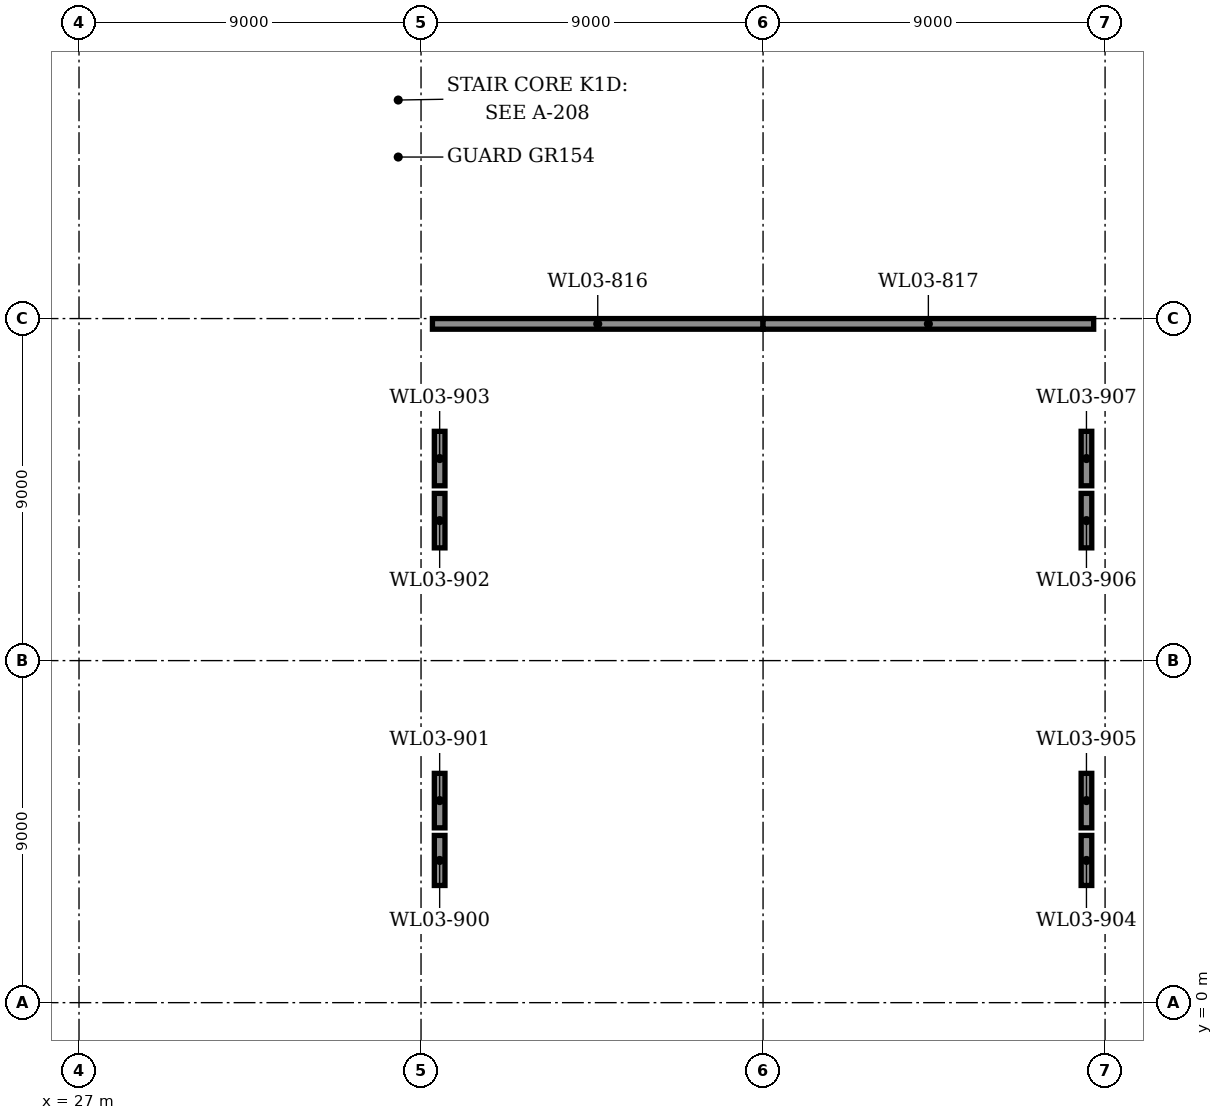
"""IFC4 building model, lengths in metres.
Left out: names, types, materials, properties, quantities, classifications, styles, units other than length and angle.
Written with IfcOpenShell. Run it as: python <this file> out.ifc"""

import sys

from ifc_helpers import new_model, si_unit, direction, frame, frame_2d, origin, origin_2d, place, context, subcontext, project, spatial, polyline, rectangle, i_section, outline, extrude, element, fill, save


model = new_model("IFC4")
c1 = context("Model", 3, precision=1e-05, world=origin(), true_north=direction((0.0, 1.0)))
c2 = subcontext(c1, "Body", "Model", "MODEL_VIEW")
j1 = project(units=[si_unit("LENGTHUNIT", "METRE"), si_unit("PLANEANGLEUNIT", "RADIAN")], contexts=[c1])
p1 = place(None, origin())
s1 = spatial("IfcSite", under=j1, at=p1, CompositionType="ELEMENT")
p2 = place(p1, origin())
s2 = spatial("IfcBuilding", under=s1, at=p2, CompositionType="ELEMENT")
p3 = place(p2, frame((0.0, 0.0, 13.4)))
s3 = spatial("IfcBuildingStorey", under=s2, at=p3, CompositionType="ELEMENT", Elevation=13.4)
p4 = place(p3, frame((45.0, 18.0, 0.0), z_axis=(0.0, 0.0, 1.0), x_axis=(1.0, 0.0, 0.0)))
e1 = element("IfcColumn", 1, at=p4, inside=s3, PredefinedType="COLUMN", context=c2, shape_type="SweptSolid", body=[
    extrude(i_section(OverallWidth=0.305, OverallDepth=0.308, WebThickness=0.01, FlangeThickness=0.015, FilletRadius=0.017, at=origin_2d()), origin(), (0.0, 0.0, 1.0), 7.4),
])
p5 = place(p3, frame((54.0, 18.09, 0.0), z_axis=(0.0, 0.0, 1.0), x_axis=(1.0, 0.0, 0.0)))
e2 = element("IfcWall", 2, at=p5, inside=s3, PredefinedType="SOLIDWALL", context=c2, shape_type="SweptSolid", body=[
    extrude(rectangle(XDim=9.0, YDim=0.3, at=frame_2d((4.5, 0.0))), origin(), (0.0, 0.0, 1.0), 7.678),
])
p6 = place(p5, frame((1.65, 0.0, 1.2)))
e3 = element("IfcOpeningElement", 3, at=p6, cuts=e2, PredefinedType="OPENING", context=c2, shape_type="SweptSolid", body=[
    extrude(rectangle(XDim=1.2, YDim=4.8, at=frame_2d((0.6, 2.4))), frame((0.0, 0.16, 0.0), z_axis=(0.0, -1.0, 0.0), x_axis=(1.0, 0.0, 0.0)), (0.0, 0.0, 1.0), 0.32),
])
p7 = place(p5, frame((6.15, 0.0, 1.2)))
e4 = element("IfcOpeningElement", 4, at=p7, cuts=e2, PredefinedType="OPENING", context=c2, shape_type="SweptSolid", body=[
    extrude(rectangle(XDim=1.2, YDim=4.8, at=frame_2d((0.6, 2.4))), frame((0.0, 0.16, 0.0), z_axis=(0.0, -1.0, 0.0), x_axis=(1.0, 0.0, 0.0)), (0.0, 0.0, 1.0), 0.32),
])
p8 = place(p3, frame((27.09, 22.5, 0.0), z_axis=(0.0, 0.0, 1.0), x_axis=(0.0, 1.0, 0.0)))
e5 = element("IfcWall", 5, at=p8, inside=s3, PredefinedType="SOLIDWALL", context=c2, shape_type="SweptSolid", body=[
    extrude(rectangle(XDim=4.35, YDim=0.3, at=frame_2d((2.175, 0.0))), origin(), (0.0, 0.0, 1.0), 7.678),
])
p9 = place(p8, frame((1.65, 0.0, 1.2)))
e6 = element("IfcOpeningElement", 6, at=p9, cuts=e5, PredefinedType="OPENING", context=c2, shape_type="SweptSolid", body=[
    extrude(rectangle(XDim=1.2, YDim=4.8, at=frame_2d((0.6, 2.4))), frame((0.0, 0.16, 0.0), z_axis=(0.0, -1.0, 0.0), x_axis=(1.0, 0.0, 0.0)), (0.0, 0.0, 1.0), 0.32),
])
for number, where, z_axis, x_axis in (
    (7, (36.49, 0.35, 0.0), (0.0, 0.0, 1.0), (0.0, 1.0, 0.0)),
    (8, (53.51, 0.35, 0.0), (0.0, 0.0, 1.0), (0.0, 1.0, 0.0)),
):
    element("IfcWall", number, at=place(p3, frame(where, z_axis=z_axis, x_axis=x_axis)), inside=s3, PredefinedType="SOLIDWALL", context=c2, shape_type="SweptSolid", body=[
        extrude(rectangle(XDim=17.65, YDim=0.28, at=frame_2d((8.825, 0.0))), origin(), (0.0, 0.0, 1.0), 5.073),
    ])
p10 = place(p3, frame((36.49, 3.083, 5.073), z_axis=(0.0, 0.0, 1.0), x_axis=(0.0, 1.0, 0.0)))
e9 = element("IfcWall", 9, at=p10, inside=s3, PredefinedType="SOLIDWALL", context=c2, shape_type="SweptSolid", body=[
    extrude(rectangle(XDim=1.317, YDim=0.28, at=frame_2d((0.658, 0.0))), origin(), (0.0, 0.0, 1.0), 2.6),
])
for number, where, z_axis, x_axis in (
    (10, (36.49, 4.6, 5.073), (0.0, 0.0, 1.0), (0.0, 1.0, 0.0)),
    (11, (36.49, 11.967, 5.073), (0.0, 0.0, 1.0), (0.0, 1.0, 0.0)),
    (12, (36.49, 13.6, 5.073), (0.0, 0.0, 1.0), (0.0, 1.0, 0.0)),
):
    element("IfcWall", number, at=place(p3, frame(where, z_axis=z_axis, x_axis=x_axis)), inside=s3, PredefinedType="SOLIDWALL", context=c2, shape_type="SweptSolid", body=[
        extrude(rectangle(XDim=1.433, YDim=0.28, at=frame_2d((0.717, 0.0))), origin(), (0.0, 0.0, 1.0), 2.6),
    ])
p11 = place(p3, frame((53.51, 3.083, 5.073), z_axis=(0.0, 0.0, 1.0), x_axis=(0.0, 1.0, 0.0)))
e13 = element("IfcWall", 13, at=p11, inside=s3, PredefinedType="SOLIDWALL", context=c2, shape_type="SweptSolid", body=[
    extrude(rectangle(XDim=1.317, YDim=0.28, at=frame_2d((0.658, 0.0))), origin(), (0.0, 0.0, 1.0), 2.6),
])
for number, where, z_axis, x_axis in (
    (14, (53.51, 4.6, 5.073), (0.0, 0.0, 1.0), (0.0, 1.0, 0.0)),
    (15, (53.51, 11.967, 5.073), (0.0, 0.0, 1.0), (0.0, 1.0, 0.0)),
    (16, (53.51, 13.6, 5.073), (0.0, 0.0, 1.0), (0.0, 1.0, 0.0)),
):
    element("IfcWall", number, at=place(p3, frame(where, z_axis=z_axis, x_axis=x_axis)), inside=s3, PredefinedType="SOLIDWALL", context=c2, shape_type="SweptSolid", body=[
        extrude(rectangle(XDim=1.433, YDim=0.28, at=frame_2d((0.717, 0.0))), origin(), (0.0, 0.0, 1.0), 2.6),
    ])
p12 = place(p3, frame((36.63, 0.275, 7.673), z_axis=(0.0, 0.0, 1.0), x_axis=(1.0, 0.0, 0.0)))
e17 = element("IfcWall", 17, at=p12, inside=s3, PredefinedType="SOLIDWALL", context=c2, shape_type="SweptSolid", body=[
    extrude(outline(polyline([(0.0, 0.0), (8.37, 0.0), (8.37, 3.207), (0.0, 0.05), (0.0, 0.0)])), frame((0.0, 0.14, 0.0), z_axis=(0.0, -1.0, 0.0), x_axis=(1.0, 0.0, 0.0)), (0.0, 0.0, 1.0), 0.28),
])
p13 = place(p3, frame((45.0, 0.275, 7.673), z_axis=(0.0, 0.0, 1.0), x_axis=(1.0, 0.0, 0.0)))
e18 = element("IfcWall", 18, at=p13, inside=s3, PredefinedType="SOLIDWALL", context=c2, shape_type="SweptSolid", body=[
    extrude(outline(polyline([(0.0, 0.0), (8.37, 0.0), (8.37, 0.05), (0.0, 3.207), (0.0, 0.0)])), frame((0.0, 0.14, 0.0), z_axis=(0.0, -1.0, 0.0), x_axis=(1.0, 0.0, 0.0)), (0.0, 0.0, 1.0), 0.28),
])
p14 = place(p3, frame((36.3, 17.86, 7.673), z_axis=(0.0, 0.0, 1.0), x_axis=(1.0, 0.0, 0.0)))
e19 = element("IfcWall", 19, at=p14, inside=s3, PredefinedType="SOLIDWALL", context=c2, shape_type="SweptSolid", body=[
    extrude(outline(polyline([(0.0, 0.0), (8.7, 0.0), (8.7, 3.207), (0.0, 0.05), (0.0, 0.0)])), frame((0.0, 0.14, 0.0), z_axis=(0.0, -1.0, 0.0), x_axis=(1.0, 0.0, 0.0)), (0.0, 0.0, 1.0), 0.28),
])
p15 = place(p3, frame((45.0, 17.86, 7.673), z_axis=(0.0, 0.0, 1.0), x_axis=(1.0, 0.0, 0.0)))
e20 = element("IfcWall", 20, at=p15, inside=s3, PredefinedType="SOLIDWALL", context=c2, shape_type="SweptSolid", body=[
    extrude(outline(polyline([(0.0, 0.0), (8.7, 0.0), (8.7, 0.05), (0.0, 3.207), (0.0, 0.0)])), frame((0.0, 0.14, 0.0), z_axis=(0.0, -1.0, 0.0), x_axis=(1.0, 0.0, 0.0)), (0.0, 0.0, 1.0), 0.28),
])
p16 = place(p3, frame((27.0, 18.15, 0.0), z_axis=(0.0, 0.0, 1.0), x_axis=(1.0, 0.0, 0.0)))
e21 = element("IfcWall", 21, at=p16, inside=s3, PredefinedType="SOLIDWALL", context=c2, shape_type="SweptSolid", body=[
    extrude(rectangle(XDim=9.0, YDim=0.3, at=frame_2d((4.5, 0.0))), origin(), (0.0, 0.0, 1.0), 7.428),
])
p17 = place(p3, frame((35.85, 18.3, 0.0), z_axis=(0.0, 0.0, 1.0), x_axis=(0.0, 1.0, 0.0)))
e22 = element("IfcWall", 22, at=p17, inside=s3, PredefinedType="SOLIDWALL", context=c2, shape_type="SweptSolid", body=[
    extrude(rectangle(XDim=3.9, YDim=0.3, at=frame_2d((1.95, 0.0))), origin(), (0.0, 0.0, 1.0), 7.428),
])
p18 = place(p3, frame((27.0, 22.35, 0.0), z_axis=(0.0, 0.0, 1.0), x_axis=(1.0, 0.0, 0.0)))
e23 = element("IfcWall", 23, at=p18, inside=s3, PredefinedType="SOLIDWALL", context=c2, shape_type="SweptSolid", body=[
    extrude(rectangle(XDim=9.0, YDim=0.3, at=frame_2d((4.5, 0.0))), origin(), (0.0, 0.0, 1.0), 7.428),
])
p19 = place(p18, frame((6.05, 0.0, 0.0)))
e24 = element("IfcOpeningElement", 24, at=p19, cuts=e23, PredefinedType="OPENING", context=c2, shape_type="SweptSolid", body=[
    extrude(rectangle(XDim=1.8, YDim=2.1, at=frame_2d((0.9, 1.05))), frame((0.0, 0.16, 0.0), z_axis=(0.0, -1.0, 0.0), x_axis=(1.0, 0.0, 0.0)), (0.0, 0.0, 1.0), 0.32),
])
p20 = place(p3, frame((27.15, 18.3, 0.0), z_axis=(0.0, 0.0, 1.0), x_axis=(0.0, 1.0, 0.0)))
e25 = element("IfcWall", 25, at=p20, inside=s3, PredefinedType="SOLIDWALL", context=c2, shape_type="SweptSolid", body=[
    extrude(rectangle(XDim=3.9, YDim=0.3, at=frame_2d((1.95, 0.0))), origin(), (0.0, 0.0, 1.0), 7.428),
])
p21 = place(p3, frame((36.0, 22.5, 0.0), z_axis=(0.0, 0.0, 1.0), x_axis=(0.0, 1.0, 0.0)))
e26 = element("IfcWall", 26, at=p21, inside=s3, PredefinedType="PARTITIONING", context=c2, shape_type="SweptSolid", body=[
    extrude(rectangle(XDim=1.5, YDim=0.15, at=frame_2d((0.75, 0.0))), origin(), (0.0, 0.0, 1.0), 6.88),
])
p22 = place(p3, frame((36.0, 24.0, 0.0), z_axis=(0.0, 0.0, 1.0), x_axis=(1.0, 0.0, 0.0)))
e27 = element("IfcWall", 27, at=p22, inside=s3, PredefinedType="PARTITIONING", context=c2, shape_type="SweptSolid", body=[
    extrude(rectangle(XDim=18.0, YDim=0.15, at=frame_2d((9.0, 0.0))), origin(), (0.0, 0.0, 1.0), 6.88),
])
p23 = place(p22, frame((7.785, 0.0, 0.0)))
e28 = element("IfcOpeningElement", 28, at=p23, cuts=e27, PredefinedType="OPENING", context=c2, shape_type="SweptSolid", body=[
    extrude(rectangle(XDim=2.4, YDim=2.4, at=frame_2d((1.2, 1.2))), frame((0.0, 0.085, 0.0), z_axis=(0.0, -1.0, 0.0), x_axis=(1.0, 0.0, 0.0)), (0.0, 0.0, 1.0), 0.17),
])
p24 = place(p3, frame((54.0, 18.0, 0.0), z_axis=(0.0, 0.0, 1.0), x_axis=(0.0, 1.0, 0.0)))
e29 = element("IfcWall", 29, at=p24, inside=s3, PredefinedType="PARTITIONING", context=c2, shape_type="SweptSolid", body=[
    extrude(rectangle(XDim=6.0, YDim=0.15, at=frame_2d((3.0, 0.0))), origin(), (0.0, 0.0, 1.0), 6.88),
])
p25 = place(p24, frame((1.882, 0.0, 0.0)))
e30 = element("IfcOpeningElement", 30, at=p25, cuts=e29, PredefinedType="OPENING", context=c2, shape_type="SweptSolid", body=[
    extrude(rectangle(XDim=2.4, YDim=2.4, at=frame_2d((1.2, 1.2))), frame((0.0, 0.085, 0.0), z_axis=(0.0, -1.0, 0.0), x_axis=(1.0, 0.0, 0.0)), (0.0, 0.0, 1.0), 0.17),
])
p26 = place(p9, origin())
e31 = element("IfcWindow", 31, at=p26, inside=s3, PartitioningType="SINGLE_PANEL", PredefinedType="WINDOW", context=c2, shape_type="SweptSolid", body=[
    extrude(rectangle(XDim=1.2, YDim=4.8, at=frame_2d((0.6, 2.4))), frame((0.0, 0.03, 0.0), z_axis=(0.0, -1.0, 0.0), x_axis=(1.0, 0.0, 0.0)), (0.0, 0.0, 1.0), 0.06),
])
fill(e6, e31)
p27 = place(p2, frame((0.0, 0.0, 21.2)))
p28 = place(p27, frame((27.0, 18.139, -0.122), z_axis=(0.0, 0.0, 1.0), x_axis=(1.0, 0.0, 0.0)))
p29 = place(p28, frame((0.45, 0.0, 0.15)))
p30 = place(p29, origin())
e32 = element("IfcWindow", 32, at=p30, inside=s3, PartitioningType="SINGLE_PANEL", PredefinedType="SKYLIGHT", context=c2, shape_type="SweptSolid", body=[
    extrude(rectangle(XDim=3.6, YDim=1.0, at=frame_2d((1.8, 0.5))), frame((0.0, 0.03, 0.0), z_axis=(0.0, -1.0, 0.0), x_axis=(1.0, 0.0, 0.0)), (0.0, 0.0, 1.0), 0.06),
])
p31 = place(p28, frame((4.95, 0.0, 0.15)))
p32 = place(p31, origin())
e33 = element("IfcWindow", 33, at=p32, inside=s3, PartitioningType="SINGLE_PANEL", PredefinedType="SKYLIGHT", context=c2, shape_type="SweptSolid", body=[
    extrude(rectangle(XDim=3.6, YDim=1.0, at=frame_2d((1.8, 0.5))), frame((0.0, 0.03, 0.0), z_axis=(0.0, -1.0, 0.0), x_axis=(1.0, 0.0, 0.0)), (0.0, 0.0, 1.0), 0.06),
])
p33 = place(p27, frame((53.7, 18.139, -0.146), z_axis=(0.0, 0.0, 1.0), x_axis=(1.0, 0.0, 0.0)))
p34 = place(p33, frame((0.75, 0.0, 0.15)))
p35 = place(p34, origin())
e34 = element("IfcWindow", 34, at=p35, inside=s3, PartitioningType="SINGLE_PANEL", PredefinedType="SKYLIGHT", context=c2, shape_type="SweptSolid", body=[
    extrude(rectangle(XDim=3.6, YDim=1.0, at=frame_2d((1.8, 0.5))), frame((0.0, 0.03, 0.0), z_axis=(0.0, -1.0, 0.0), x_axis=(1.0, 0.0, 0.0)), (0.0, 0.0, 1.0), 0.06),
])
p36 = place(p19, frame((1.8, 0.0, 0.0), z_axis=(0.0, 0.0, 1.0), x_axis=(-1.0, 0.0, 0.0)))
e35 = element("IfcDoor", 35, at=p36, inside=s3, OperationType="DOUBLE_DOOR_SINGLE_SWING", PredefinedType="DOOR", context=c2, shape_type="SweptSolid", body=[
    extrude(rectangle(XDim=1.8, YDim=2.1, at=frame_2d((0.9, 1.05))), frame((0.0, 0.025, 0.0), z_axis=(0.0, -1.0, 0.0), x_axis=(1.0, 0.0, 0.0)), (0.0, 0.0, 1.0), 0.05),
])
fill(e24, e35)
p37 = place(p23, origin())
e36 = element("IfcDoor", 36, at=p37, inside=s3, OperationType="DOUBLE_DOOR_SINGLE_SWING", PredefinedType="DOOR", context=c2, shape_type="SweptSolid", body=[
    extrude(rectangle(XDim=2.4, YDim=2.4, at=frame_2d((1.2, 1.2))), frame((0.0, 0.025, 0.0), z_axis=(0.0, -1.0, 0.0), x_axis=(1.0, 0.0, 0.0)), (0.0, 0.0, 1.0), 0.05),
])
fill(e28, e36)
p38 = place(p25, origin())
e37 = element("IfcDoor", 37, at=p38, inside=s3, OperationType="DOUBLE_DOOR_SINGLE_SWING", PredefinedType="DOOR", context=c2, shape_type="SweptSolid", body=[
    extrude(rectangle(XDim=2.4, YDim=2.4, at=frame_2d((1.2, 1.2))), frame((0.0, 0.025, 0.0), z_axis=(0.0, -1.0, 0.0), x_axis=(1.0, 0.0, 0.0)), (0.0, 0.0, 1.0), 0.05),
])
fill(e30, e37)
save(model, sys.argv[1])
